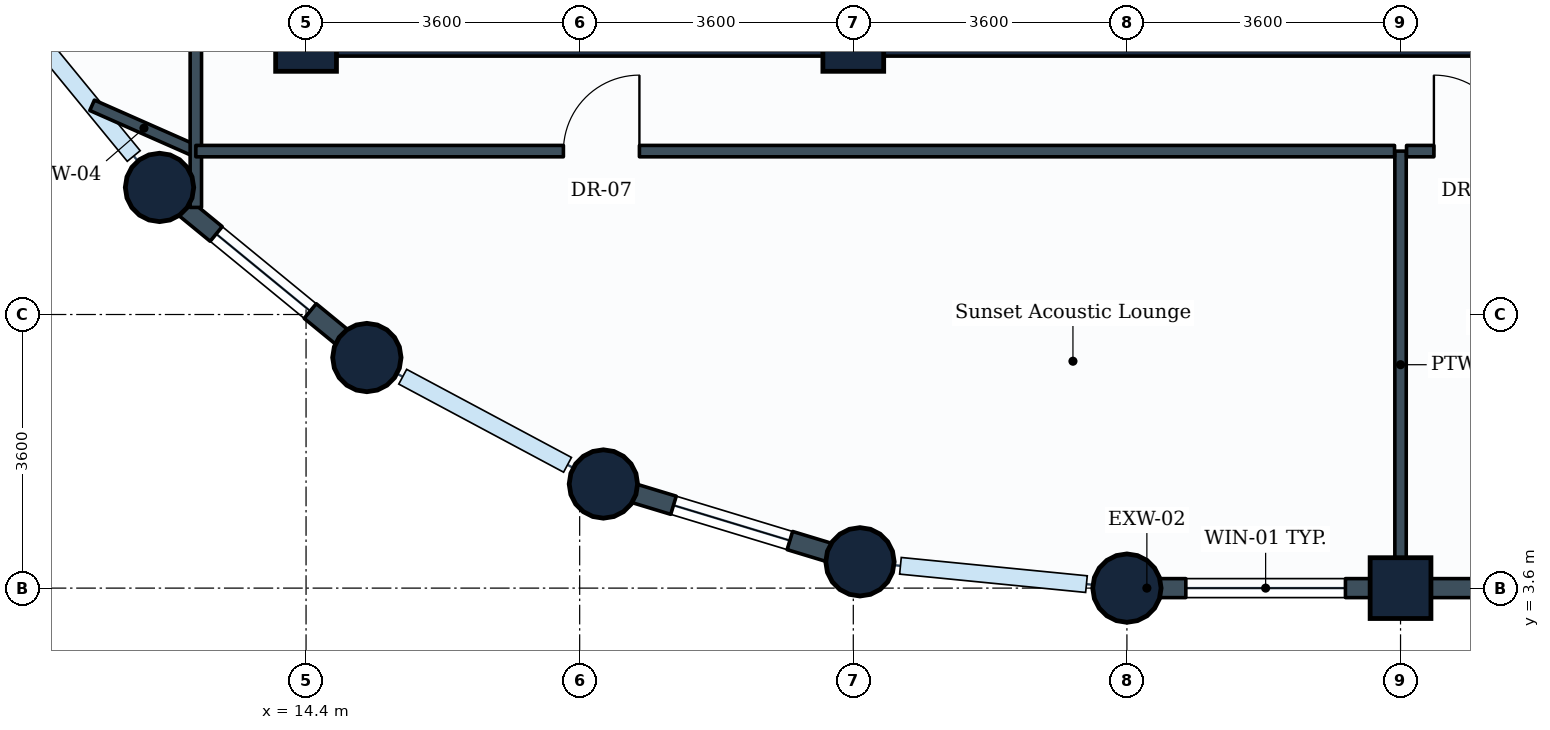
"""IFC4 building model, lengths in metres.
Left out: names, types, materials, properties, quantities, classifications, styles, units other than length and angle.
Written with IfcOpenShell. Run it as: python <this file> out.ifc"""

import sys

from ifc_helpers import new_model, si_unit, direction, frame, frame_2d, origin, origin_2d, place, context, subcontext, project, spatial, rectangle, circle, extrude, element, fill, save


model = new_model("IFC4")
c1 = context("Model", 3, precision=1e-05, world=origin(), true_north=direction((0.0, 1.0)))
c2 = subcontext(c1, "Body", "Model", "MODEL_VIEW")
j1 = project(units=[si_unit("LENGTHUNIT", "METRE"), si_unit("PLANEANGLEUNIT", "RADIAN")], contexts=[c1])
p1 = place(None, origin())
s1 = spatial("IfcSite", under=j1, at=p1, CompositionType="ELEMENT")
p2 = place(p1, origin())
s2 = spatial("IfcBuilding", under=s1, at=p2, CompositionType="ELEMENT")
p3 = place(p2, frame((0.0, 0.0, 291.8)))
s3 = spatial("IfcBuildingStorey", under=s2, at=p3, CompositionType="ELEMENT", Elevation=291.8)
p4 = place(p3, frame((12.472, 8.872, 0.0), z_axis=(0.0, 0.0, 1.0), x_axis=(1.0, 0.0, 0.0)))
e1 = element("IfcColumn", 1, at=p4, inside=s3, PredefinedType="COLUMN", context=c2, shape_type="SweptSolid", body=[
    extrude(circle(Radius=0.45, at=origin_2d()), origin(), (0.0, 0.0, 1.0), 3.6),
])
p5 = place(p3, frame((14.4, 10.8, 0.0), z_axis=(0.0, 0.0, 1.0), x_axis=(1.0, 0.0, 0.0)))
e2 = element("IfcColumn", 2, at=p5, inside=s3, PredefinedType="COLUMN", context=c2, shape_type="SweptSolid", body=[
    extrude(rectangle(XDim=0.8, YDim=0.8, at=origin_2d()), origin(), (0.0, 0.0, 1.0), 3.6),
])
for number, where, z_axis, x_axis in (
    (3, (15.2, 6.634, 0.0), (0.0, 0.0, 1.0), (1.0, 0.0, 0.0)),
    (4, (18.312, 4.97, 0.0), (0.0, 0.0, 1.0), (1.0, 0.0, 0.0)),
):
    element("IfcColumn", number, at=place(p3, frame(where, z_axis=z_axis, x_axis=x_axis)), inside=s3, PredefinedType="COLUMN", context=c2, shape_type="SweptSolid", body=[
        extrude(circle(Radius=0.45, at=origin_2d()), origin(), (0.0, 0.0, 1.0), 3.6),
    ])
p6 = place(p3, frame((21.6, 10.8, 0.0), z_axis=(0.0, 0.0, 1.0), x_axis=(1.0, 0.0, 0.0)))
e5 = element("IfcColumn", 5, at=p6, inside=s3, PredefinedType="COLUMN", context=c2, shape_type="SweptSolid", body=[
    extrude(rectangle(XDim=0.8, YDim=0.8, at=origin_2d()), origin(), (0.0, 0.0, 1.0), 3.6),
])
for number, where, z_axis, x_axis in (
    (6, (21.688, 3.946, 0.0), (0.0, 0.0, 1.0), (1.0, 0.0, 0.0)),
    (7, (25.2, 3.6, 0.0), (0.0, 0.0, 1.0), (1.0, 0.0, 0.0)),
):
    element("IfcColumn", number, at=place(p3, frame(where, z_axis=z_axis, x_axis=x_axis)), inside=s3, PredefinedType="COLUMN", context=c2, shape_type="SweptSolid", body=[
        extrude(circle(Radius=0.45, at=origin_2d()), origin(), (0.0, 0.0, 1.0), 3.6),
    ])
p7 = place(p3, frame((28.8, 3.6, 0.0), z_axis=(0.0, 0.0, 1.0), x_axis=(1.0, 0.0, 0.0)))
e8 = element("IfcColumn", 8, at=p7, inside=s3, PredefinedType="COLUMN", context=c2, shape_type="SweptSolid", body=[
    extrude(rectangle(XDim=0.8, YDim=0.8, at=origin_2d()), origin(), (0.0, 0.0, 1.0), 3.6),
])
p8 = place(p3, frame((28.8, 3.6, 0.0), z_axis=(0.0, 0.0, 1.0), x_axis=(-1.0, 0.0, 0.0)))
e9 = element("IfcWall", 9, at=p8, inside=s3, PredefinedType="STANDARD", context=c2, shape_type="SweptSolid", body=[
    extrude(rectangle(XDim=3.6, YDim=0.25, at=frame_2d((1.8, 0.0))), origin(), (0.0, 0.0, 1.0), 2.83),
])
p9 = place(p8, frame((0.725, 0.0, 0.85)))
e10 = element("IfcOpeningElement", 10, at=p9, cuts=e9, PredefinedType="OPENING", context=c2, shape_type="SweptSolid", body=[
    extrude(rectangle(XDim=2.1, YDim=1.35, at=frame_2d((1.05, 0.675))), frame((0.0, 0.135, 0.0), z_axis=(0.0, -1.0, 0.0), x_axis=(1.0, 0.0, 0.0)), (0.0, 0.0, 1.0), 0.27),
])
p10 = place(p3, frame((32.4, 3.6, 0.0), z_axis=(0.0, 0.0, 1.0), x_axis=(-1.0, 0.0, 0.0)))
e11 = element("IfcWall", 11, at=p10, inside=s3, PredefinedType="STANDARD", context=c2, shape_type="SweptSolid", body=[
    extrude(rectangle(XDim=3.6, YDim=0.25, at=frame_2d((1.8, 0.0))), origin(), (0.0, 0.0, 1.0), 2.83),
])
p11 = place(p3, frame((15.2, 6.634, 0.0), z_axis=(0.0, 0.0, 1.0), x_axis=(-0.773121216285, 0.634258295121, 0.0)))
e12 = element("IfcWall", 12, at=p11, inside=s3, PredefinedType="STANDARD", context=c2, shape_type="SweptSolid", body=[
    extrude(rectangle(XDim=3.529, YDim=0.25, at=frame_2d((1.764, 0.0))), origin(), (0.0, 0.0, 1.0), 2.83),
])
p12 = place(p11, frame((0.964, 0.0, 0.85)))
e13 = element("IfcOpeningElement", 13, at=p12, cuts=e12, PredefinedType="OPENING", context=c2, shape_type="SweptSolid", body=[
    extrude(rectangle(XDim=1.6, YDim=1.35, at=frame_2d((0.8, 0.675))), frame((0.0, 0.135, 0.0), z_axis=(0.0, -1.0, 0.0), x_axis=(1.0, 0.0, 0.0)), (0.0, 0.0, 1.0), 0.27),
])
p13 = place(p3, frame((21.688, 3.946, 0.0), z_axis=(0.0, 0.0, 1.0), x_axis=(-0.956953367403, 0.290241714123, 0.0)))
e14 = element("IfcWall", 14, at=p13, inside=s3, PredefinedType="STANDARD", context=c2, shape_type="SweptSolid", body=[
    extrude(rectangle(XDim=3.528, YDim=0.25, at=frame_2d((1.764, 0.0))), origin(), (0.0, 0.0, 1.0), 2.83),
])
p14 = place(p13, frame((0.964, 0.0, 0.85)))
e15 = element("IfcOpeningElement", 15, at=p14, cuts=e14, PredefinedType="OPENING", context=c2, shape_type="SweptSolid", body=[
    extrude(rectangle(XDim=1.6, YDim=1.35, at=frame_2d((0.8, 0.675))), frame((0.0, 0.135, 0.0), z_axis=(0.0, -1.0, 0.0), x_axis=(1.0, 0.0, 0.0)), (0.0, 0.0, 1.0), 0.27),
])
p15 = place(p3, frame((14.4, 10.8, 0.0), z_axis=(0.0, 0.0, 1.0), x_axis=(1.0, 0.0, 0.0)))
e16 = element("IfcWall", 16, at=p15, inside=s3, PredefinedType="SHEAR", context=c2, shape_type="SweptSolid", body=[
    extrude(rectangle(XDim=18.0, YDim=0.4, at=frame_2d((9.0, 0.0))), origin(), (0.0, 0.0, 1.0), 3.35),
])
p16 = place(p3, frame((28.8, 9.35, 0.0), z_axis=(0.0, 0.0, 1.0), x_axis=(0.0, -1.0, 0.0)))
e17 = element("IfcWall", 17, at=p16, inside=s3, PredefinedType="PARTITIONING", context=c2, shape_type="SweptSolid", body=[
    extrude(rectangle(XDim=5.621, YDim=0.15, at=frame_2d((2.811, 0.0))), origin(), (0.0, 0.0, 1.0), 3.335),
])
p17 = place(p3, frame((12.95, 9.35, 0.0), z_axis=(0.0, 0.0, 1.0), x_axis=(-0.914773794999, 0.403966463934, 0.0)))
e18 = element("IfcWall", 18, at=p17, inside=s3, PredefinedType="PARTITIONING", context=c2, shape_type="SweptSolid", body=[
    extrude(rectangle(XDim=1.492, YDim=0.15, at=frame_2d((0.746, 0.0))), origin(), (0.0, 0.0, 1.0), 2.83),
])
p18 = place(p3, frame((12.95, 8.609, 0.0), z_axis=(0.0, 0.0, 1.0), x_axis=(0.0, 1.0, 0.0)))
e19 = element("IfcWall", 19, at=p18, inside=s3, PredefinedType="PARTITIONING", context=c2, shape_type="SweptSolid", body=[
    extrude(rectangle(XDim=16.512, YDim=0.15, at=frame_2d((8.256, 0.0))), origin(), (0.0, 0.0, 1.0), 2.83),
])
p19 = place(p18, frame((7.731, 0.0, 0.0)))
e20 = element("IfcOpeningElement", 20, at=p19, cuts=e19, PredefinedType="OPENING", context=c2, shape_type="SweptSolid", body=[
    extrude(rectangle(XDim=1.0, YDim=2.1, at=frame_2d((0.5, 1.05))), frame((0.0, 0.085, 0.0), z_axis=(0.0, -1.0, 0.0), x_axis=(1.0, 0.0, 0.0)), (0.0, 0.0, 1.0), 0.17),
])
p20 = place(p3, frame((12.95, 9.35, 0.0), z_axis=(0.0, 0.0, 1.0), x_axis=(1.0, 0.0, 0.0)))
e21 = element("IfcWall", 21, at=p20, inside=s3, PredefinedType="PARTITIONING", context=c2, shape_type="SweptSolid", body=[
    extrude(rectangle(XDim=15.771, YDim=0.15, at=frame_2d((7.885, 0.0))), origin(), (0.0, 0.0, 1.0), 3.02),
])
p21 = place(p20, frame((4.836, 0.0, 0.0)))
e22 = element("IfcOpeningElement", 22, at=p21, cuts=e21, PredefinedType="OPENING", context=c2, shape_type="SweptSolid", body=[
    extrude(rectangle(XDim=1.0, YDim=2.1, at=frame_2d((0.5, 1.05))), frame((0.0, 0.085, 0.0), z_axis=(0.0, -1.0, 0.0), x_axis=(1.0, 0.0, 0.0)), (0.0, 0.0, 1.0), 0.17),
])
p22 = place(p3, frame((28.879, 9.35, 0.0), z_axis=(0.0, 0.0, 1.0), x_axis=(1.0, 0.0, 0.0)))
e23 = element("IfcWall", 23, at=p22, inside=s3, PredefinedType="PARTITIONING", context=c2, shape_type="SweptSolid", body=[
    extrude(rectangle(XDim=5.521, YDim=0.15, at=frame_2d((2.76, 0.0))), origin(), (0.0, 0.0, 1.0), 3.335),
])
p23 = place(p22, frame((0.36, 0.0, 0.0)))
e24 = element("IfcOpeningElement", 24, at=p23, cuts=e23, PredefinedType="OPENING", context=c2, shape_type="SweptSolid", body=[
    extrude(rectangle(XDim=1.0, YDim=2.1, at=frame_2d((0.5, 1.05))), frame((0.0, 0.085, 0.0), z_axis=(0.0, -1.0, 0.0), x_axis=(1.0, 0.0, 0.0)), (0.0, 0.0, 1.0), 0.17),
])
p24 = place(p9, origin())
e25 = element("IfcWindow", 25, at=p24, inside=s3, PartitioningType="SINGLE_PANEL", PredefinedType="WINDOW", context=c2, shape_type="SweptSolid", body=[
    extrude(rectangle(XDim=2.1, YDim=1.35, at=frame_2d((1.05, 0.675))), frame((0.0, 0.03, 0.0), z_axis=(0.0, -1.0, 0.0), x_axis=(1.0, 0.0, 0.0)), (0.0, 0.0, 1.0), 0.06),
])
fill(e10, e25)
p25 = place(p12, origin())
e26 = element("IfcWindow", 26, at=p25, inside=s3, PartitioningType="SINGLE_PANEL", PredefinedType="WINDOW", context=c2, shape_type="SweptSolid", body=[
    extrude(rectangle(XDim=1.6, YDim=1.35, at=frame_2d((0.8, 0.675))), frame((0.0, 0.03, 0.0), z_axis=(0.0, -1.0, 0.0), x_axis=(1.0, 0.0, 0.0)), (0.0, 0.0, 1.0), 0.06),
])
fill(e13, e26)
p26 = place(p14, origin())
e27 = element("IfcWindow", 27, at=p26, inside=s3, PartitioningType="SINGLE_PANEL", PredefinedType="WINDOW", context=c2, shape_type="SweptSolid", body=[
    extrude(rectangle(XDim=1.6, YDim=1.35, at=frame_2d((0.8, 0.675))), frame((0.0, 0.03, 0.0), z_axis=(0.0, -1.0, 0.0), x_axis=(1.0, 0.0, 0.0)), (0.0, 0.0, 1.0), 0.06),
])
fill(e15, e27)
p27 = place(p21, origin())
e28 = element("IfcDoor", 28, at=p27, inside=s3, OperationType="SINGLE_SWING_RIGHT", PredefinedType="DOOR", context=c2, shape_type="SweptSolid", body=[
    extrude(rectangle(XDim=1.0, YDim=2.1, at=frame_2d((0.5, 1.05))), frame((0.0, 0.025, 0.0), z_axis=(0.0, -1.0, 0.0), x_axis=(1.0, 0.0, 0.0)), (0.0, 0.0, 1.0), 0.05),
])
fill(e22, e28)
p28 = place(p23, origin())
e29 = element("IfcDoor", 29, at=p28, inside=s3, OperationType="SINGLE_SWING_LEFT", PredefinedType="DOOR", context=c2, shape_type="SweptSolid", body=[
    extrude(rectangle(XDim=1.0, YDim=2.1, at=frame_2d((0.5, 1.05))), frame((0.0, 0.025, 0.0), z_axis=(0.0, -1.0, 0.0), x_axis=(1.0, 0.0, 0.0)), (0.0, 0.0, 1.0), 0.05),
])
fill(e24, e29)
save(model, sys.argv[1])
